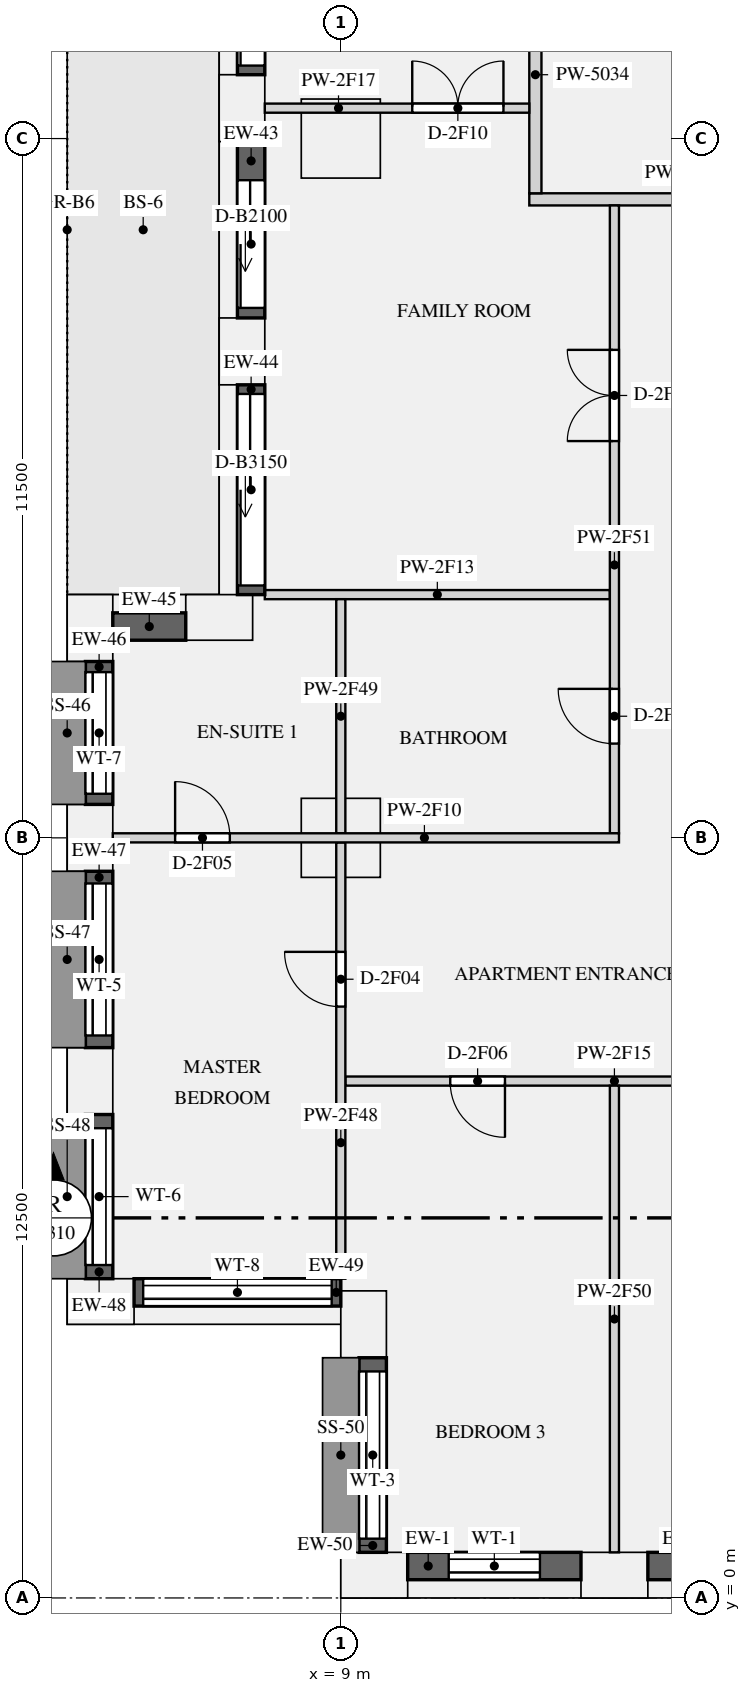
"""IFC4 building model, lengths in metres.
Left out: names, types, materials, properties, quantities, classifications, styles, units other than length and angle.
Written with IfcOpenShell. Run it as: python <this file> out.ifc"""

import sys

from ifc_helpers import new_model, si_unit, direction, frame, frame_2d, origin, origin_2d, place, context, subcontext, project, spatial, rectangle, extrude, element, fill, save


model = new_model("IFC4")
c1 = context("Model", 3, precision=1e-05, world=origin(), true_north=direction((0.0, 1.0)))
c2 = subcontext(c1, "Body", "Model", "MODEL_VIEW")
j1 = project(units=[si_unit("LENGTHUNIT", "METRE"), si_unit("PLANEANGLEUNIT", "RADIAN")], contexts=[c1])
p1 = place(None, origin())
s1 = spatial("IfcSite", under=j1, at=p1, CompositionType="ELEMENT")
p2 = place(p1, origin())
s2 = spatial("IfcBuilding", under=s1, at=p2, CompositionType="ELEMENT")
p3 = place(p2, frame((0.0, 0.0, 124.5)))
s3 = spatial("IfcBuildingStorey", under=s2, at=p3, CompositionType="ELEMENT", Elevation=124.5)
for number, where, z_axis, x_axis in (
    (1, (9.55, 0.375, 0.0), (0.0, 0.0, 1.0), (1.0, 0.0, 0.0)),
    (2, (13.5, 0.375, 0.0), (0.0, 0.0, 1.0), (1.0, 0.0, 0.0)),
    (3, (7.375, 24.5, 0.0), (0.0, 0.0, 1.0), (0.0, -1.0, 0.0)),
    (4, (7.375, 20.5, 0.0), (0.0, 0.0, 1.0), (0.0, -1.0, 0.0)),
    (5, (7.0, 16.125, 0.0), (0.0, 0.0, 1.0), (-1.0, 0.0, 0.0)),
    (6, (4.875, 15.95, 0.0), (0.0, 0.0, 1.0), (0.0, -1.0, 0.0)),
    (7, (4.875, 12.5, 0.0), (0.0, 0.0, 1.0), (0.0, -1.0, 0.0)),
    (8, (4.875, 8.5, 0.0), (0.0, 0.0, 1.0), (0.0, -1.0, 0.0)),
    (9, (5.05, 4.875, 0.0), (0.0, 0.0, 1.0), (1.0, 0.0, 0.0)),
    (10, (9.375, 4.5, 0.0), (0.0, 0.0, 1.0), (0.0, -1.0, 0.0)),
):
    element("IfcColumn", number, at=place(p3, frame(where, z_axis=z_axis, x_axis=x_axis)), inside=s3, PredefinedType="USERDEFINED", context=c2, shape_type="SweptSolid", body=[
        extrude(rectangle(XDim=1.1, YDim=0.75, at=origin_2d()), origin(), (0.0, 0.0, 1.0), 3.15),
    ])
for number, where, z_axis, x_axis in (
    (11, (9.0, 24.0, 0.0), (0.0, 0.0, 1.0), (1.0, 0.0, 0.0)),
    (12, (9.0, 12.5, 0.0), (0.0, 0.0, 1.0), (1.0, 0.0, 0.0)),
):
    element("IfcColumn", number, at=place(p3, frame(where, z_axis=z_axis, x_axis=x_axis)), inside=s3, PredefinedType="COLUMN", context=c2, shape_type="SweptSolid", body=[
        extrude(rectangle(XDim=1.3, YDim=1.3, at=origin_2d()), origin(), (0.0, 0.0, 1.0), 3.15),
    ])
p4 = place(p3, frame((10.1, 0.525, 0.9), z_axis=(0.0, 0.0, 1.0), x_axis=(1.0, 0.0, 0.0)))
e13 = element("IfcWall", 13, at=p4, inside=s3, PredefinedType="SOLIDWALL", context=c2, shape_type="SweptSolid", body=[
    extrude(rectangle(XDim=2.85, YDim=0.45, at=frame_2d((1.425, 0.0))), origin(), (0.0, 0.0, 1.0), 1.93),
])
p5 = place(p4, frame((0.675, 0.0, 0.15)))
e14 = element("IfcOpeningElement", 14, at=p5, cuts=e13, PredefinedType="OPENING", context=c2, shape_type="SweptSolid", body=[
    extrude(rectangle(XDim=1.5, YDim=1.5, at=frame_2d((0.75, 0.75))), frame((0.0, 0.235, 0.0), z_axis=(0.0, -1.0, 0.0), x_axis=(1.0, 0.0, 0.0)), (0.0, 0.0, 1.0), 0.47),
])
p6 = place(p3, frame((14.05, 0.525, 0.9), z_axis=(0.0, 0.0, 1.0), x_axis=(1.0, 0.0, 0.0)))
e15 = element("IfcWall", 15, at=p6, inside=s3, PredefinedType="SOLIDWALL", context=c2, shape_type="SweptSolid", body=[
    extrude(rectangle(XDim=3.95, YDim=0.45, at=frame_2d((1.975, 0.0))), origin(), (0.0, 0.0, 1.0), 1.93),
])
p7 = place(p6, frame((1.225, 0.0, 0.15)))
e16 = element("IfcOpeningElement", 16, at=p7, cuts=e15, PredefinedType="OPENING", context=c2, shape_type="SweptSolid", body=[
    extrude(rectangle(XDim=1.5, YDim=1.5, at=frame_2d((0.75, 0.75))), frame((0.0, 0.235, 0.0), z_axis=(0.0, -1.0, 0.0), x_axis=(1.0, 0.0, 0.0)), (0.0, 0.0, 1.0), 0.47),
])
p8 = place(p3, frame((7.525, 27.95, 0.0), z_axis=(0.0, 0.0, 1.0), x_axis=(0.0, -1.0, 0.0)))
e17 = element("IfcWall", 17, at=p8, inside=s3, PredefinedType="SOLIDWALL", context=c2, shape_type="SweptSolid", body=[
    extrude(rectangle(XDim=2.9, YDim=0.45, at=frame_2d((1.45, 0.0))), origin(), (0.0, 0.0, 1.0), 2.83),
])
p9 = place(p8, frame((0.15, 0.0, 0.0)))
e18 = element("IfcOpeningElement", 18, at=p9, cuts=e17, PredefinedType="OPENING", context=c2, shape_type="SweptSolid", body=[
    extrude(rectangle(XDim=2.6, YDim=2.3, at=frame_2d((1.3, 1.15))), frame((0.0, 0.235, 0.0), z_axis=(0.0, -1.0, 0.0), x_axis=(1.0, 0.0, 0.0)), (0.0, 0.0, 1.0), 0.47),
])
p10 = place(p3, frame((7.525, 23.95, 0.0), z_axis=(0.0, 0.0, 1.0), x_axis=(0.0, -1.0, 0.0)))
e19 = element("IfcWall", 19, at=p10, inside=s3, PredefinedType="SOLIDWALL", context=c2, shape_type="SweptSolid", body=[
    extrude(rectangle(XDim=2.9, YDim=0.45, at=frame_2d((1.45, 0.0))), origin(), (0.0, 0.0, 1.0), 2.83),
])
p11 = place(p10, frame((0.635, 0.0, 0.0)))
e20 = element("IfcOpeningElement", 20, at=p11, cuts=e19, PredefinedType="OPENING", context=c2, shape_type="SweptSolid", body=[
    extrude(rectangle(XDim=2.1, YDim=2.3, at=frame_2d((1.05, 1.15))), frame((0.0, 0.235, 0.0), z_axis=(0.0, -1.0, 0.0), x_axis=(1.0, 0.0, 0.0)), (0.0, 0.0, 1.0), 0.47),
])
p12 = place(p3, frame((7.525, 19.95, 0.0), z_axis=(0.0, 0.0, 1.0), x_axis=(0.0, -1.0, 0.0)))
e21 = element("IfcWall", 21, at=p12, inside=s3, PredefinedType="SOLIDWALL", context=c2, shape_type="SweptSolid", body=[
    extrude(rectangle(XDim=3.45, YDim=0.45, at=frame_2d((1.725, 0.0))), origin(), (0.0, 0.0, 1.0), 2.83),
])
p13 = place(p12, frame((0.15, 0.0, 0.0)))
e22 = element("IfcOpeningElement", 22, at=p13, cuts=e21, PredefinedType="OPENING", context=c2, shape_type="SweptSolid", body=[
    extrude(rectangle(XDim=3.15, YDim=2.3, at=frame_2d((1.575, 1.15))), frame((0.0, 0.235, 0.0), z_axis=(0.0, -1.0, 0.0), x_axis=(1.0, 0.0, 0.0)), (0.0, 0.0, 1.0), 0.47),
])
p14 = place(p3, frame((6.45, 15.975, 0.9), z_axis=(0.0, 0.0, 1.0), x_axis=(-1.0, 0.0, 0.0)))
e23 = element("IfcWall", 23, at=p14, inside=s3, PredefinedType="SOLIDWALL", context=c2, shape_type="SweptSolid", body=[
    extrude(rectangle(XDim=1.2, YDim=0.45, at=frame_2d((0.6, 0.0))), origin(), (0.0, 0.0, 1.0), 1.93),
])
p15 = place(p3, frame((5.025, 15.4, 0.9), z_axis=(0.0, 0.0, 1.0), x_axis=(0.0, -1.0, 0.0)))
e24 = element("IfcWall", 24, at=p15, inside=s3, PredefinedType="SOLIDWALL", context=c2, shape_type="SweptSolid", body=[
    extrude(rectangle(XDim=2.35, YDim=0.45, at=frame_2d((1.175, 0.0))), origin(), (0.0, 0.0, 1.0), 1.93),
])
p16 = place(p15, frame((0.175, 0.0, 0.15)))
e25 = element("IfcOpeningElement", 25, at=p16, cuts=e24, PredefinedType="OPENING", context=c2, shape_type="SweptSolid", body=[
    extrude(rectangle(XDim=2.0, YDim=1.5, at=frame_2d((1.0, 0.75))), frame((0.0, 0.235, 0.0), z_axis=(0.0, -1.0, 0.0), x_axis=(1.0, 0.0, 0.0)), (0.0, 0.0, 1.0), 0.47),
])
p17 = place(p3, frame((5.025, 11.95, 0.9), z_axis=(0.0, 0.0, 1.0), x_axis=(0.0, -1.0, 0.0)))
e26 = element("IfcWall", 26, at=p17, inside=s3, PredefinedType="SOLIDWALL", context=c2, shape_type="SweptSolid", body=[
    extrude(rectangle(XDim=2.9, YDim=0.45, at=frame_2d((1.45, 0.0))), origin(), (0.0, 0.0, 1.0), 1.93),
])
p18 = place(p17, frame((0.2, 0.0, 0.15)))
e27 = element("IfcOpeningElement", 27, at=p18, cuts=e26, PredefinedType="OPENING", context=c2, shape_type="SweptSolid", body=[
    extrude(rectangle(XDim=2.5, YDim=1.5, at=frame_2d((1.25, 0.75))), frame((0.0, 0.235, 0.0), z_axis=(0.0, -1.0, 0.0), x_axis=(1.0, 0.0, 0.0)), (0.0, 0.0, 1.0), 0.47),
])
p19 = place(p3, frame((5.025, 7.95, 0.9), z_axis=(0.0, 0.0, 1.0), x_axis=(0.0, -1.0, 0.0)))
e28 = element("IfcWall", 28, at=p19, inside=s3, PredefinedType="SOLIDWALL", context=c2, shape_type="SweptSolid", body=[
    extrude(rectangle(XDim=2.7, YDim=0.45, at=frame_2d((1.35, 0.0))), origin(), (0.0, 0.0, 1.0), 1.93),
])
p20 = place(p19, frame((0.225, 0.0, 0.15)))
e29 = element("IfcOpeningElement", 29, at=p20, cuts=e28, PredefinedType="OPENING", context=c2, shape_type="SweptSolid", body=[
    extrude(rectangle(XDim=2.25, YDim=1.5, at=frame_2d((1.125, 0.75))), frame((0.0, 0.235, 0.0), z_axis=(0.0, -1.0, 0.0), x_axis=(1.0, 0.0, 0.0)), (0.0, 0.0, 1.0), 0.47),
])
p21 = place(p3, frame((5.6, 5.025, 0.9), z_axis=(0.0, 0.0, 1.0), x_axis=(1.0, 0.0, 0.0)))
e30 = element("IfcWall", 30, at=p21, inside=s3, PredefinedType="SOLIDWALL", context=c2, shape_type="SweptSolid", body=[
    extrude(rectangle(XDim=3.4, YDim=0.45, at=frame_2d((1.7, 0.0))), origin(), (0.0, 0.0, 1.0), 1.93),
])
p22 = place(p21, frame((0.15, 0.0, 0.15)))
e31 = element("IfcOpeningElement", 31, at=p22, cuts=e30, PredefinedType="OPENING", context=c2, shape_type="SweptSolid", body=[
    extrude(rectangle(XDim=3.1, YDim=1.5, at=frame_2d((1.55, 0.75))), frame((0.0, 0.235, 0.0), z_axis=(0.0, -1.0, 0.0), x_axis=(1.0, 0.0, 0.0)), (0.0, 0.0, 1.0), 0.47),
])
p23 = place(p3, frame((9.525, 3.95, 0.9), z_axis=(0.0, 0.0, 1.0), x_axis=(0.0, -1.0, 0.0)))
e32 = element("IfcWall", 32, at=p23, inside=s3, PredefinedType="SOLIDWALL", context=c2, shape_type="SweptSolid", body=[
    extrude(rectangle(XDim=3.2, YDim=0.45, at=frame_2d((1.6, 0.0))), origin(), (0.0, 0.0, 1.0), 1.93),
])
p24 = place(p23, frame((0.225, 0.0, 0.15)))
e33 = element("IfcOpeningElement", 33, at=p24, cuts=e32, PredefinedType="OPENING", context=c2, shape_type="SweptSolid", body=[
    extrude(rectangle(XDim=2.75, YDim=1.5, at=frame_2d((1.375, 0.75))), frame((0.0, 0.235, 0.0), z_axis=(0.0, -1.0, 0.0), x_axis=(1.0, 0.0, 0.0)), (0.0, 0.0, 1.0), 0.47),
])
p25 = place(p3, frame((12.1, 23.0, 0.0), z_axis=(0.0, 0.0, 1.0), x_axis=(1.0, 0.0, 0.0)))
e34 = element("IfcWall", 34, at=p25, inside=s3, PredefinedType="PARTITIONING", context=c2, shape_type="SweptSolid", body=[
    extrude(rectangle(XDim=5.0, YDim=0.2, at=frame_2d((2.5, 0.0))), origin(), (0.0, 0.0, 1.0), 2.83),
])
p26 = place(p3, frame((12.2, 23.1, 0.0), z_axis=(0.0, 0.0, 1.0), x_axis=(0.0, 1.0, 0.0)))
e35 = element("IfcWall", 35, at=p26, inside=s3, PredefinedType="PARTITIONING", context=c2, shape_type="SweptSolid", body=[
    extrude(rectangle(XDim=3.9, YDim=0.2, at=frame_2d((1.95, 0.0))), origin(), (0.0, 0.0, 1.0), 2.83),
])
p27 = place(p3, frame((5.25, 12.5, 0.0), z_axis=(0.0, 0.0, 1.0), x_axis=(1.0, 0.0, 0.0)))
e36 = element("IfcWall", 36, at=p27, inside=s3, PredefinedType="PARTITIONING", context=c2, shape_type="SweptSolid", body=[
    extrude(rectangle(XDim=8.325, YDim=0.15, at=frame_2d((4.163, 0.0))), origin(), (0.0, 0.0, 1.0), 2.83),
])
p28 = place(p27, frame((1.025, 0.0, 0.0)))
e37 = element("IfcOpeningElement", 37, at=p28, cuts=e36, PredefinedType="OPENING", context=c2, shape_type="SweptSolid", body=[
    extrude(rectangle(XDim=0.9, YDim=2.1, at=frame_2d((0.45, 1.05))), frame((0.0, 0.085, 0.0), z_axis=(0.0, -1.0, 0.0), x_axis=(1.0, 0.0, 0.0)), (0.0, 0.0, 1.0), 0.17),
])
p29 = place(p3, frame((7.75, 16.5, 0.0), z_axis=(0.0, 0.0, 1.0), x_axis=(1.0, 0.0, 0.0)))
e38 = element("IfcWall", 38, at=p29, inside=s3, PredefinedType="PARTITIONING", context=c2, shape_type="SweptSolid", body=[
    extrude(rectangle(XDim=5.675, YDim=0.15, at=frame_2d((2.837, 0.0))), origin(), (0.0, 0.0, 1.0), 2.83),
])
p30 = place(p3, frame((9.075, 8.5, 0.0), z_axis=(0.0, 0.0, 1.0), x_axis=(1.0, 0.0, 0.0)))
e39 = element("IfcWall", 39, at=p30, inside=s3, PredefinedType="PARTITIONING", context=c2, shape_type="SweptSolid", body=[
    extrude(rectangle(XDim=8.925, YDim=0.15, at=frame_2d((4.462, 0.0))), origin(), (0.0, 0.0, 1.0), 2.83),
])
p31 = place(p30, frame((1.725, 0.0, 0.0)))
e40 = element("IfcOpeningElement", 40, at=p31, cuts=e39, PredefinedType="OPENING", context=c2, shape_type="SweptSolid", body=[
    extrude(rectangle(XDim=0.9, YDim=2.1, at=frame_2d((0.45, 1.05))), frame((0.0, 0.085, 0.0), z_axis=(0.0, -1.0, 0.0), x_axis=(1.0, 0.0, 0.0)), (0.0, 0.0, 1.0), 0.17),
])
p32 = place(p30, frame((6.225, 0.0, 0.0)))
e41 = element("IfcOpeningElement", 41, at=p32, cuts=e39, PredefinedType="OPENING", context=c2, shape_type="SweptSolid", body=[
    extrude(rectangle(XDim=0.9, YDim=2.1, at=frame_2d((0.45, 1.05))), frame((0.0, 0.085, 0.0), z_axis=(0.0, -1.0, 0.0), x_axis=(1.0, 0.0, 0.0)), (0.0, 0.0, 1.0), 0.17),
])
p33 = place(p3, frame((7.75, 24.5, 0.0), z_axis=(0.0, 0.0, 1.0), x_axis=(1.0, 0.0, 0.0)))
e42 = element("IfcWall", 42, at=p33, inside=s3, PredefinedType="PARTITIONING", context=c2, shape_type="SweptSolid", body=[
    extrude(rectangle(XDim=4.35, YDim=0.15, at=frame_2d((2.175, 0.0))), origin(), (0.0, 0.0, 1.0), 2.83),
])
p34 = place(p33, frame((2.425, 0.0, 0.0)))
e43 = element("IfcOpeningElement", 43, at=p34, cuts=e42, PredefinedType="OPENING", context=c2, shape_type="SweptSolid", body=[
    extrude(rectangle(XDim=1.5, YDim=2.1, at=frame_2d((0.75, 1.05))), frame((0.0, 0.085, 0.0), z_axis=(0.0, -1.0, 0.0), x_axis=(1.0, 0.0, 0.0)), (0.0, 0.0, 1.0), 0.17),
])
p35 = place(p3, frame((9.0, 5.25, 0.0), z_axis=(0.0, 0.0, 1.0), x_axis=(0.0, 1.0, 0.0)))
e44 = element("IfcWall", 44, at=p35, inside=s3, PredefinedType="PARTITIONING", context=c2, shape_type="SweptSolid", body=[
    extrude(rectangle(XDim=7.175, YDim=0.15, at=frame_2d((3.587, 0.0))), origin(), (0.0, 0.0, 1.0), 2.83),
])
p36 = place(p35, frame((4.475, 0.0, 0.0)))
e45 = element("IfcOpeningElement", 45, at=p36, cuts=e44, PredefinedType="OPENING", context=c2, shape_type="SweptSolid", body=[
    extrude(rectangle(XDim=0.9, YDim=2.1, at=frame_2d((0.45, 1.05))), frame((0.0, 0.085, 0.0), z_axis=(0.0, -1.0, 0.0), x_axis=(1.0, 0.0, 0.0)), (0.0, 0.0, 1.0), 0.17),
])
p37 = place(p3, frame((9.0, 12.575, 0.0), z_axis=(0.0, 0.0, 1.0), x_axis=(0.0, 1.0, 0.0)))
e46 = element("IfcWall", 46, at=p37, inside=s3, PredefinedType="PARTITIONING", context=c2, shape_type="SweptSolid", body=[
    extrude(rectangle(XDim=3.85, YDim=0.15, at=frame_2d((1.925, 0.0))), origin(), (0.0, 0.0, 1.0), 2.83),
])
p38 = place(p3, frame((13.5, 0.75, 0.0), z_axis=(0.0, 0.0, 1.0), x_axis=(0.0, 1.0, 0.0)))
e47 = element("IfcWall", 47, at=p38, inside=s3, PredefinedType="PARTITIONING", context=c2, shape_type="SweptSolid", body=[
    extrude(rectangle(XDim=7.675, YDim=0.15, at=frame_2d((3.837, 0.0))), origin(), (0.0, 0.0, 1.0), 2.83),
])
p39 = place(p3, frame((13.5, 12.575, 0.0), z_axis=(0.0, 0.0, 1.0), x_axis=(0.0, 1.0, 0.0)))
e48 = element("IfcWall", 48, at=p39, inside=s3, PredefinedType="PARTITIONING", context=c2, shape_type="SweptSolid", body=[
    extrude(rectangle(XDim=10.325, YDim=0.15, at=frame_2d((5.163, 0.0))), origin(), (0.0, 0.0, 1.0), 2.83),
])
p40 = place(p39, frame((1.475, 0.0, 0.0)))
e49 = element("IfcOpeningElement", 49, at=p40, cuts=e48, PredefinedType="OPENING", context=c2, shape_type="SweptSolid", body=[
    extrude(rectangle(XDim=0.9, YDim=2.1, at=frame_2d((0.45, 1.05))), frame((0.0, 0.085, 0.0), z_axis=(0.0, -1.0, 0.0), x_axis=(1.0, 0.0, 0.0)), (0.0, 0.0, 1.0), 0.17),
])
p41 = place(p39, frame((6.45, 0.0, 0.0)))
e50 = element("IfcOpeningElement", 50, at=p41, cuts=e48, PredefinedType="OPENING", context=c2, shape_type="SweptSolid", body=[
    extrude(rectangle(XDim=1.5, YDim=2.1, at=frame_2d((0.75, 1.05))), frame((0.0, 0.085, 0.0), z_axis=(0.0, -1.0, 0.0), x_axis=(1.0, 0.0, 0.0)), (0.0, 0.0, 1.0), 0.17),
])
p42 = place(p5, origin())
e51 = element("IfcWindow", 51, at=p42, inside=s3, PartitioningType="SINGLE_PANEL", PredefinedType="WINDOW", context=c2, shape_type="SweptSolid", body=[
    extrude(rectangle(XDim=1.5, YDim=1.5, at=frame_2d((0.75, 0.75))), frame((0.0, -0.065, 0.0), z_axis=(0.0, -1.0, 0.0), x_axis=(1.0, 0.0, 0.0)), (0.0, 0.0, 1.0), 0.06),
])
fill(e14, e51)
p43 = place(p9, origin())
e52 = element("IfcDoor", 52, at=p43, inside=s3, OperationType="SLIDING_TO_LEFT", PredefinedType="DOOR", context=c2, shape_type="SweptSolid", body=[
    extrude(rectangle(XDim=2.6, YDim=2.3, at=frame_2d((1.3, 1.15))), frame((0.0, -0.07, 0.0), z_axis=(0.0, -1.0, 0.0), x_axis=(1.0, 0.0, 0.0)), (0.0, 0.0, 1.0), 0.05),
])
fill(e18, e52)
p44 = place(p11, origin())
e53 = element("IfcDoor", 53, at=p44, inside=s3, OperationType="SLIDING_TO_LEFT", PredefinedType="DOOR", context=c2, shape_type="SweptSolid", body=[
    extrude(rectangle(XDim=2.1, YDim=2.3, at=frame_2d((1.05, 1.15))), frame((0.0, -0.07, 0.0), z_axis=(0.0, -1.0, 0.0), x_axis=(1.0, 0.0, 0.0)), (0.0, 0.0, 1.0), 0.05),
])
fill(e20, e53)
p45 = place(p13, origin())
e54 = element("IfcDoor", 54, at=p45, inside=s3, OperationType="SLIDING_TO_LEFT", PredefinedType="DOOR", context=c2, shape_type="SweptSolid", body=[
    extrude(rectangle(XDim=3.15, YDim=2.3, at=frame_2d((1.575, 1.15))), frame((0.0, -0.07, 0.0), z_axis=(0.0, -1.0, 0.0), x_axis=(1.0, 0.0, 0.0)), (0.0, 0.0, 1.0), 0.05),
])
fill(e22, e54)
p46 = place(p16, origin())
e55 = element("IfcWindow", 55, at=p46, inside=s3, PartitioningType="SINGLE_PANEL", PredefinedType="WINDOW", context=c2, shape_type="SweptSolid", body=[
    extrude(rectangle(XDim=2.0, YDim=1.5, at=frame_2d((1.0, 0.75))), frame((0.0, -0.065, 0.0), z_axis=(0.0, -1.0, 0.0), x_axis=(1.0, 0.0, 0.0)), (0.0, 0.0, 1.0), 0.06),
])
fill(e25, e55)
p47 = place(p18, origin())
e56 = element("IfcWindow", 56, at=p47, inside=s3, PartitioningType="SINGLE_PANEL", PredefinedType="WINDOW", context=c2, shape_type="SweptSolid", body=[
    extrude(rectangle(XDim=2.5, YDim=1.5, at=frame_2d((1.25, 0.75))), frame((0.0, -0.065, 0.0), z_axis=(0.0, -1.0, 0.0), x_axis=(1.0, 0.0, 0.0)), (0.0, 0.0, 1.0), 0.06),
])
fill(e27, e56)
p48 = place(p20, origin())
e57 = element("IfcWindow", 57, at=p48, inside=s3, PartitioningType="SINGLE_PANEL", PredefinedType="WINDOW", context=c2, shape_type="SweptSolid", body=[
    extrude(rectangle(XDim=2.25, YDim=1.5, at=frame_2d((1.125, 0.75))), frame((0.0, -0.065, 0.0), z_axis=(0.0, -1.0, 0.0), x_axis=(1.0, 0.0, 0.0)), (0.0, 0.0, 1.0), 0.06),
])
fill(e29, e57)
p49 = place(p22, origin())
e58 = element("IfcWindow", 58, at=p49, inside=s3, PartitioningType="SINGLE_PANEL", PredefinedType="WINDOW", context=c2, shape_type="SweptSolid", body=[
    extrude(rectangle(XDim=3.1, YDim=1.5, at=frame_2d((1.55, 0.75))), frame((0.0, -0.065, 0.0), z_axis=(0.0, -1.0, 0.0), x_axis=(1.0, 0.0, 0.0)), (0.0, 0.0, 1.0), 0.06),
])
fill(e31, e58)
p50 = place(p24, origin())
e59 = element("IfcWindow", 59, at=p50, inside=s3, PartitioningType="SINGLE_PANEL", PredefinedType="WINDOW", context=c2, shape_type="SweptSolid", body=[
    extrude(rectangle(XDim=2.75, YDim=1.5, at=frame_2d((1.375, 0.75))), frame((0.0, -0.065, 0.0), z_axis=(0.0, -1.0, 0.0), x_axis=(1.0, 0.0, 0.0)), (0.0, 0.0, 1.0), 0.06),
])
fill(e33, e59)
p51 = place(p36, origin())
e60 = element("IfcDoor", 60, at=p51, inside=s3, OperationType="SINGLE_SWING_RIGHT", PredefinedType="DOOR", context=c2, shape_type="SweptSolid", body=[
    extrude(rectangle(XDim=0.9, YDim=2.1, at=frame_2d((0.45, 1.05))), frame((0.0, 0.025, 0.0), z_axis=(0.0, -1.0, 0.0), x_axis=(1.0, 0.0, 0.0)), (0.0, 0.0, 1.0), 0.05),
])
fill(e45, e60)
p52 = place(p28, origin())
e61 = element("IfcDoor", 61, at=p52, inside=s3, OperationType="SINGLE_SWING_LEFT", PredefinedType="DOOR", context=c2, shape_type="SweptSolid", body=[
    extrude(rectangle(XDim=0.9, YDim=2.1, at=frame_2d((0.45, 1.05))), frame((0.0, 0.025, 0.0), z_axis=(0.0, -1.0, 0.0), x_axis=(1.0, 0.0, 0.0)), (0.0, 0.0, 1.0), 0.05),
])
fill(e37, e61)
p53 = place(p31, frame((0.9, 0.0, 0.0), z_axis=(0.0, 0.0, 1.0), x_axis=(-1.0, 0.0, 0.0)))
e62 = element("IfcDoor", 62, at=p53, inside=s3, OperationType="SINGLE_SWING_LEFT", PredefinedType="DOOR", context=c2, shape_type="SweptSolid", body=[
    extrude(rectangle(XDim=0.9, YDim=2.1, at=frame_2d((0.45, 1.05))), frame((0.0, 0.025, 0.0), z_axis=(0.0, -1.0, 0.0), x_axis=(1.0, 0.0, 0.0)), (0.0, 0.0, 1.0), 0.05),
])
fill(e40, e62)
p54 = place(p40, origin())
e63 = element("IfcDoor", 63, at=p54, inside=s3, OperationType="SINGLE_SWING_RIGHT", PredefinedType="DOOR", context=c2, shape_type="SweptSolid", body=[
    extrude(rectangle(XDim=0.9, YDim=2.1, at=frame_2d((0.45, 1.05))), frame((0.0, 0.025, 0.0), z_axis=(0.0, -1.0, 0.0), x_axis=(1.0, 0.0, 0.0)), (0.0, 0.0, 1.0), 0.05),
])
fill(e49, e63)
p55 = place(p41, origin())
e64 = element("IfcDoor", 64, at=p55, inside=s3, OperationType="DOUBLE_DOOR_SINGLE_SWING", PredefinedType="DOOR", context=c2, shape_type="SweptSolid", body=[
    extrude(rectangle(XDim=1.5, YDim=2.1, at=frame_2d((0.75, 1.05))), frame((0.0, 0.025, 0.0), z_axis=(0.0, -1.0, 0.0), x_axis=(1.0, 0.0, 0.0)), (0.0, 0.0, 1.0), 0.05),
])
fill(e50, e64)
p56 = place(p34, origin())
e65 = element("IfcDoor", 65, at=p56, inside=s3, OperationType="DOUBLE_DOOR_SINGLE_SWING", PredefinedType="DOOR", context=c2, shape_type="SweptSolid", body=[
    extrude(rectangle(XDim=1.5, YDim=2.1, at=frame_2d((0.75, 1.05))), frame((0.0, 0.025, 0.0), z_axis=(0.0, -1.0, 0.0), x_axis=(1.0, 0.0, 0.0)), (0.0, 0.0, 1.0), 0.05),
])
fill(e43, e65)
save(model, sys.argv[1])
